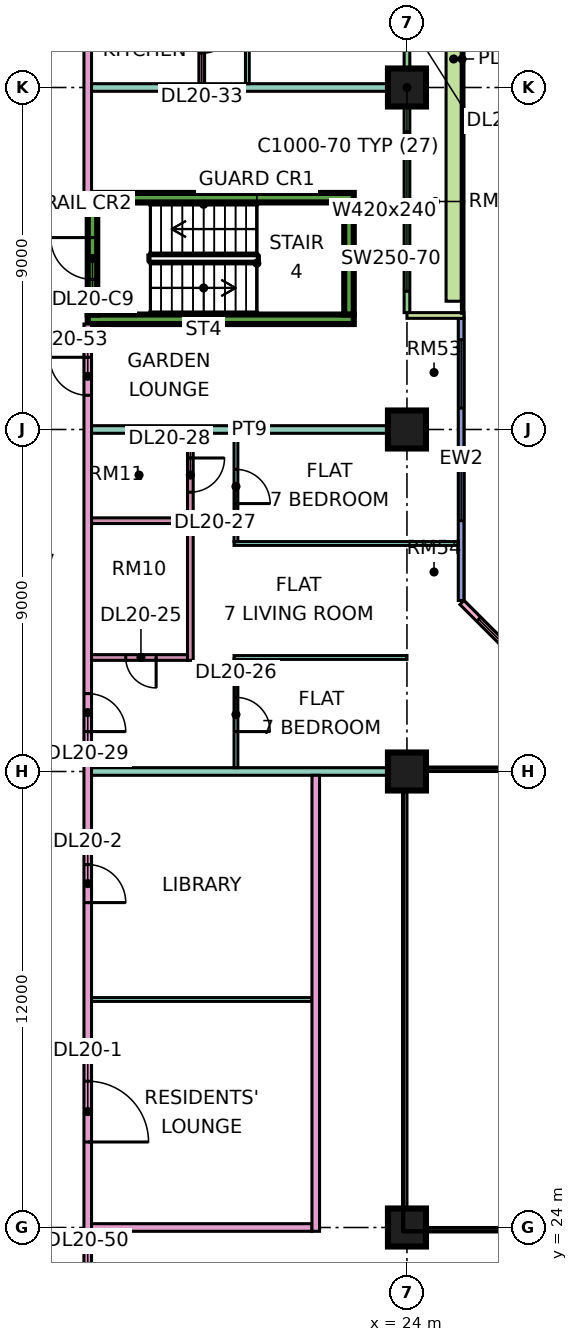
"""IFC4 building model, lengths in metres.
Left out: names, types, materials, properties, quantities, classifications, styles, units other than length and angle.
Written with IfcOpenShell. Run it as: python <this file> out.ifc"""

import sys

from ifc_helpers import new_model, si_unit, direction, frame, frame_2d, origin, origin_2d, place, context, subcontext, project, spatial, rectangle, extrude, element, fill, save


model = new_model("IFC4")
c1 = context("Model", 3, precision=1e-05, world=origin(), true_north=direction((0.0, 1.0)))
c2 = subcontext(c1, "Body", "Model", "MODEL_VIEW")
j1 = project(units=[si_unit("LENGTHUNIT", "METRE"), si_unit("PLANEANGLEUNIT", "RADIAN")], contexts=[c1])
p1 = place(None, origin())
s1 = spatial("IfcSite", under=j1, at=p1, CompositionType="ELEMENT")
p2 = place(p1, origin())
s2 = spatial("IfcBuilding", under=s1, at=p2, CompositionType="ELEMENT")
p3 = place(p2, frame((0.0, 0.0, 91.9)))
s3 = spatial("IfcBuildingStorey", under=s2, at=p3, CompositionType="ELEMENT", Elevation=91.9)
for number, where, z_axis, x_axis in (
    (1, (24.0, 24.0, 0.0), (0.0, 0.0, 1.0), (1.0, 0.0, 0.0)),
    (2, (24.0, 36.0, 0.0), (0.0, 0.0, 1.0), (1.0, 0.0, 0.0)),
    (3, (24.0, 45.0, 0.0), (0.0, 0.0, 1.0), (1.0, 0.0, 0.0)),
    (4, (24.0, 54.0, 0.0), (0.0, 0.0, 1.0), (1.0, 0.0, 0.0)),
):
    element("IfcColumn", number, at=place(p3, frame(where, z_axis=z_axis, x_axis=x_axis)), inside=s3, PredefinedType="COLUMN", context=c2, shape_type="SweptSolid", body=[
        extrude(rectangle(XDim=1.0, YDim=1.0, at=origin_2d()), origin(), (0.0, 0.0, 1.0), 3.75),
    ])
for number, where, z_axis, x_axis in (
    (5, (15.6, 47.9, 0.0), (0.0, 0.0, 1.0), (1.0, 0.0, 0.0)),
    (6, (15.6, 51.1, 0.0), (0.0, 0.0, 1.0), (1.0, 0.0, 0.0)),
):
    element("IfcWall", number, at=place(p3, frame(where, z_axis=z_axis, x_axis=x_axis)), inside=s3, PredefinedType="SHEAR", context=c2, shape_type="SweptSolid", body=[
        extrude(rectangle(XDim=7.0, YDim=0.25, at=frame_2d((3.5, 0.0))), origin(), (0.0, 0.0, 1.0), 3.75),
    ])
p4 = place(p3, frame((15.725, 48.025, 0.0), z_axis=(0.0, 0.0, 1.0), x_axis=(0.0, 1.0, 0.0)))
e7 = element("IfcWall", 7, at=p4, inside=s3, PredefinedType="SHEAR", context=c2, shape_type="SweptSolid", body=[
    extrude(rectangle(XDim=2.95, YDim=0.25, at=frame_2d((1.475, 0.0))), origin(), (0.0, 0.0, 1.0), 3.75),
])
p5 = place(p4, frame((0.925, 0.0, 0.0)))
e8 = element("IfcOpeningElement", 8, at=p5, cuts=e7, PredefinedType="OPENING", context=c2, shape_type="SweptSolid", body=[
    extrude(rectangle(XDim=1.1, YDim=2.2, at=frame_2d((0.55, 1.1))), frame((0.0, 0.135, 0.0), z_axis=(0.0, -1.0, 0.0), x_axis=(1.0, 0.0, 0.0)), (0.0, 0.0, 1.0), 0.27),
])
p6 = place(p3, frame((22.475, 48.025, 0.0), z_axis=(0.0, 0.0, 1.0), x_axis=(0.0, 1.0, 0.0)))
e9 = element("IfcWall", 9, at=p6, inside=s3, PredefinedType="SHEAR", context=c2, shape_type="SweptSolid", body=[
    extrude(rectangle(XDim=2.95, YDim=0.25, at=frame_2d((1.475, 0.0))), origin(), (0.0, 0.0, 1.0), 3.75),
])
p7 = place(p3, frame((28.447, 37.447, 0.0), z_axis=(0.0, 0.0, 1.0), x_axis=(-0.707106781187, 0.707106781187, 0.0)))
e10 = element("IfcWall", 10, at=p7, inside=s3, PredefinedType="SOLIDWALL", context=c2, shape_type="SweptSolid", body=[
    extrude(rectangle(XDim=4.243, YDim=0.15, at=frame_2d((2.121, 0.0))), origin(), (0.0, 0.0, 1.0), 3.35),
])
p8 = place(p7, frame((0.621, 0.0, 0.45)))
e11 = element("IfcOpeningElement", 11, at=p8, cuts=e10, PredefinedType="OPENING", context=c2, shape_type="SweptSolid", body=[
    extrude(rectangle(XDim=3.0, YDim=2.4, at=frame_2d((1.5, 1.2))), frame((0.0, 0.085, 0.0), z_axis=(0.0, -1.0, 0.0), x_axis=(1.0, 0.0, 0.0)), (0.0, 0.0, 1.0), 0.17),
])
p9 = place(p3, frame((25.425, 40.5, 0.0), z_axis=(0.0, 0.0, 1.0), x_axis=(0.0, 1.0, 0.0)))
e12 = element("IfcWall", 12, at=p9, inside=s3, PredefinedType="SOLIDWALL", context=c2, shape_type="SweptSolid", body=[
    extrude(rectangle(XDim=7.425, YDim=0.15, at=frame_2d((3.712, 0.0))), origin(), (0.0, 0.0, 1.0), 3.35),
])
p10 = place(p9, frame((2.1, 0.0, 0.45)))
e13 = element("IfcOpeningElement", 13, at=p10, cuts=e12, PredefinedType="OPENING", context=c2, shape_type="SweptSolid", body=[
    extrude(rectangle(XDim=1.8, YDim=2.4, at=frame_2d((0.9, 1.2))), frame((0.0, 0.085, 0.0), z_axis=(0.0, -1.0, 0.0), x_axis=(1.0, 0.0, 0.0)), (0.0, 0.0, 1.0), 0.17),
])
p11 = place(p9, frame((5.062, 0.0, 0.45)))
e14 = element("IfcOpeningElement", 14, at=p11, cuts=e12, PredefinedType="OPENING", context=c2, shape_type="SweptSolid", body=[
    extrude(rectangle(XDim=1.8, YDim=2.4, at=frame_2d((0.9, 1.2))), frame((0.0, 0.085, 0.0), z_axis=(0.0, -1.0, 0.0), x_axis=(1.0, 0.0, 0.0)), (0.0, 0.0, 1.0), 0.17),
])
p12 = place(p3, frame((24.0, 48.075, 0.0), z_axis=(0.0, 0.0, 1.0), x_axis=(0.0, 1.0, 0.0)))
e15 = element("IfcWall", 15, at=p12, inside=s3, PredefinedType="SOLIDWALL", context=c2, shape_type="SweptSolid", body=[
    extrude(rectangle(XDim=13.35, YDim=0.15, at=frame_2d((6.675, 0.0))), origin(), (0.0, 0.0, 1.0), 3.35),
])
p13 = place(p12, frame((0.562, 0.0, 0.45)))
e16 = element("IfcOpeningElement", 16, at=p13, cuts=e15, PredefinedType="OPENING", context=c2, shape_type="SweptSolid", body=[
    extrude(rectangle(XDim=4.2, YDim=2.4, at=frame_2d((2.1, 1.2))), frame((0.0, 0.085, 0.0), z_axis=(0.0, -1.0, 0.0), x_axis=(1.0, 0.0, 0.0)), (0.0, 0.0, 1.0), 0.17),
])
p14 = place(p12, frame((7.125, 0.0, 0.0)))
e17 = element("IfcOpeningElement", 17, at=p14, cuts=e15, PredefinedType="OPENING", context=c2, shape_type="SweptSolid", body=[
    extrude(rectangle(XDim=1.2, YDim=2.4, at=frame_2d((0.6, 1.2))), frame((0.0, 0.085, 0.0), z_axis=(0.0, -1.0, 0.0), x_axis=(1.0, 0.0, 0.0)), (0.0, 0.0, 1.0), 0.17),
])
p15 = place(p12, frame((9.525, 0.0, 0.45)))
e18 = element("IfcOpeningElement", 18, at=p15, cuts=e15, PredefinedType="OPENING", context=c2, shape_type="SweptSolid", body=[
    extrude(rectangle(XDim=1.8, YDim=2.4, at=frame_2d((0.9, 1.2))), frame((0.0, 0.085, 0.0), z_axis=(0.0, -1.0, 0.0), x_axis=(1.0, 0.0, 0.0)), (0.0, 0.0, 1.0), 0.17),
])
p16 = place(p12, frame((12.188, 0.0, 0.45)))
e19 = element("IfcOpeningElement", 19, at=p16, cuts=e15, PredefinedType="OPENING", context=c2, shape_type="SweptSolid", body=[
    extrude(rectangle(XDim=0.9, YDim=2.4, at=frame_2d((0.45, 1.2))), frame((0.0, 0.085, 0.0), z_axis=(0.0, -1.0, 0.0), x_axis=(1.0, 0.0, 0.0)), (0.0, 0.0, 1.0), 0.17),
])
p17 = place(p3, frame((25.5, 48.0, 0.0), z_axis=(0.0, 0.0, 1.0), x_axis=(-1.0, 0.0, 0.0)))
e20 = element("IfcWall", 20, at=p17, inside=s3, PredefinedType="SOLIDWALL", context=c2, shape_type="SweptSolid", body=[
    extrude(rectangle(XDim=1.5, YDim=0.15, at=frame_2d((0.75, 0.0))), origin(), (0.0, 0.0, 1.0), 3.35),
])
p18 = place(p3, frame((25.229, 48.375, 0.0), z_axis=(0.0, 0.0, 1.0), x_axis=(0.0, 1.0, 0.0)))
e21 = element("IfcWall", 21, at=p18, inside=s3, PredefinedType="SOLIDWALL", context=c2, shape_type="SweptSolid", body=[
    extrude(rectangle(XDim=12.75, YDim=0.4, at=frame_2d((6.375, 0.0))), origin(), (0.0, 0.0, 1.0), 0.7),
])
p19 = place(p3, frame((15.6, 20.0, 0.0), z_axis=(0.0, 0.0, 1.0), x_axis=(0.0, 1.0, 0.0)))
e22 = element("IfcWall", 22, at=p19, inside=s3, PredefinedType="PARTITIONING", context=c2, shape_type="SweptSolid", body=[
    extrude(rectangle(XDim=27.775, YDim=0.2, at=frame_2d((13.887, 0.0))), origin(), (0.0, 0.0, 1.0), 3.35),
])
p20 = place(p19, frame((6.25, 0.0, 0.0)))
e23 = element("IfcOpeningElement", 23, at=p20, cuts=e22, PredefinedType="OPENING", context=c2, shape_type="SweptSolid", body=[
    extrude(rectangle(XDim=1.6, YDim=2.1, at=frame_2d((0.8, 1.05))), frame((0.0, 0.11, 0.0), z_axis=(0.0, -1.0, 0.0), x_axis=(1.0, 0.0, 0.0)), (0.0, 0.0, 1.0), 0.22),
])
p21 = place(p19, frame((12.55, 0.0, 0.0)))
e24 = element("IfcOpeningElement", 24, at=p21, cuts=e22, PredefinedType="OPENING", context=c2, shape_type="SweptSolid", body=[
    extrude(rectangle(XDim=1.0, YDim=2.1, at=frame_2d((0.5, 1.05))), frame((0.0, 0.11, 0.0), z_axis=(0.0, -1.0, 0.0), x_axis=(1.0, 0.0, 0.0)), (0.0, 0.0, 1.0), 0.22),
])
p22 = place(p19, frame((17.05, 0.0, 0.0)))
e25 = element("IfcOpeningElement", 25, at=p22, cuts=e22, PredefinedType="OPENING", context=c2, shape_type="SweptSolid", body=[
    extrude(rectangle(XDim=1.0, YDim=2.1, at=frame_2d((0.5, 1.05))), frame((0.0, 0.11, 0.0), z_axis=(0.0, -1.0, 0.0), x_axis=(1.0, 0.0, 0.0)), (0.0, 0.0, 1.0), 0.22),
])
p23 = place(p19, frame((1.15, 0.0, 0.0)))
e26 = element("IfcOpeningElement", 26, at=p23, cuts=e22, PredefinedType="OPENING", context=c2, shape_type="SweptSolid", body=[
    extrude(rectangle(XDim=1.8, YDim=2.1, at=frame_2d((0.9, 1.05))), frame((0.0, 0.11, 0.0), z_axis=(0.0, -1.0, 0.0), x_axis=(1.0, 0.0, 0.0)), (0.0, 0.0, 1.0), 0.22),
])
p24 = place(p19, frame((25.9, 0.0, 0.0)))
e27 = element("IfcOpeningElement", 27, at=p24, cuts=e22, PredefinedType="OPENING", context=c2, shape_type="SweptSolid", body=[
    extrude(rectangle(XDim=1.0, YDim=2.1, at=frame_2d((0.5, 1.05))), frame((0.0, 0.11, 0.0), z_axis=(0.0, -1.0, 0.0), x_axis=(1.0, 0.0, 0.0)), (0.0, 0.0, 1.0), 0.22),
])
p25 = place(p3, frame((15.6, 51.225, 0.0), z_axis=(0.0, 0.0, 1.0), x_axis=(0.0, 1.0, 0.0)))
e28 = element("IfcWall", 28, at=p25, inside=s3, PredefinedType="PARTITIONING", context=c2, shape_type="SweptSolid", body=[
    extrude(rectangle(XDim=13.125, YDim=0.2, at=frame_2d((6.562, 0.0))), origin(), (0.0, 0.0, 1.0), 3.35),
])
p26 = place(p25, frame((9.825, 0.0, 0.0)))
e29 = element("IfcOpeningElement", 29, at=p26, cuts=e28, PredefinedType="OPENING", context=c2, shape_type="SweptSolid", body=[
    extrude(rectangle(XDim=1.0, YDim=2.1, at=frame_2d((0.5, 1.05))), frame((0.0, 0.11, 0.0), z_axis=(0.0, -1.0, 0.0), x_axis=(1.0, 0.0, 0.0)), (0.0, 0.0, 1.0), 0.22),
])
p27 = place(p3, frame((15.7, 24.0, 0.0), z_axis=(0.0, 0.0, 1.0), x_axis=(1.0, 0.0, 0.0)))
e30 = element("IfcWall", 30, at=p27, inside=s3, PredefinedType="PARTITIONING", context=c2, shape_type="SweptSolid", body=[
    extrude(rectangle(XDim=5.8, YDim=0.2, at=frame_2d((2.9, 0.0))), origin(), (0.0, 0.0, 1.0), 3.35),
])
p28 = place(p3, frame((15.7, 30.0, 0.0), z_axis=(0.0, 0.0, 1.0), x_axis=(1.0, 0.0, 0.0)))
e31 = element("IfcWall", 31, at=p28, inside=s3, PredefinedType="PARTITIONING", context=c2, shape_type="SweptSolid", body=[
    extrude(rectangle(XDim=5.8, YDim=0.1, at=frame_2d((2.9, 0.0))), origin(), (0.0, 0.0, 1.0), 3.35),
])
p29 = place(p3, frame((15.7, 36.0, 0.0), z_axis=(0.0, 0.0, 1.0), x_axis=(1.0, 0.0, 0.0)))
e32 = element("IfcWall", 32, at=p29, inside=s3, PredefinedType="PARTITIONING", context=c2, shape_type="SweptSolid", body=[
    extrude(rectangle(XDim=8.3, YDim=0.2, at=frame_2d((4.15, 0.0))), origin(), (0.0, 0.0, 1.0), 3.35),
])
p30 = place(p3, frame((15.7, 39.0, 0.0), z_axis=(0.0, 0.0, 1.0), x_axis=(1.0, 0.0, 0.0)))
e33 = element("IfcWall", 33, at=p30, inside=s3, PredefinedType="PARTITIONING", context=c2, shape_type="SweptSolid", body=[
    extrude(rectangle(XDim=2.525, YDim=0.15, at=frame_2d((1.263, 0.0))), origin(), (0.0, 0.0, 1.0), 3.35),
])
p31 = place(p30, frame((0.9, 0.0, 0.0)))
e34 = element("IfcOpeningElement", 34, at=p31, cuts=e33, PredefinedType="OPENING", context=c2, shape_type="SweptSolid", body=[
    extrude(rectangle(XDim=0.8, YDim=2.1, at=frame_2d((0.4, 1.05))), frame((0.0, 0.085, 0.0), z_axis=(0.0, -1.0, 0.0), x_axis=(1.0, 0.0, 0.0)), (0.0, 0.0, 1.0), 0.17),
])
p32 = place(p3, frame((15.7, 42.6, 0.0), z_axis=(0.0, 0.0, 1.0), x_axis=(1.0, 0.0, 0.0)))
e35 = element("IfcWall", 35, at=p32, inside=s3, PredefinedType="PARTITIONING", context=c2, shape_type="SweptSolid", body=[
    extrude(rectangle(XDim=2.525, YDim=0.15, at=frame_2d((1.263, 0.0))), origin(), (0.0, 0.0, 1.0), 3.35),
])
p33 = place(p3, frame((15.7, 45.0, 0.0), z_axis=(0.0, 0.0, 1.0), x_axis=(1.0, 0.0, 0.0)))
e36 = element("IfcWall", 36, at=p33, inside=s3, PredefinedType="PARTITIONING", context=c2, shape_type="SweptSolid", body=[
    extrude(rectangle(XDim=8.3, YDim=0.2, at=frame_2d((4.15, 0.0))), origin(), (0.0, 0.0, 1.0), 3.35),
])
p34 = place(p3, frame((15.7, 54.0, 0.0), z_axis=(0.0, 0.0, 1.0), x_axis=(1.0, 0.0, 0.0)))
e37 = element("IfcWall", 37, at=p34, inside=s3, PredefinedType="PARTITIONING", context=c2, shape_type="SweptSolid", body=[
    extrude(rectangle(XDim=8.226, YDim=0.2, at=frame_2d((4.113, 0.0))), origin(), (0.0, 0.0, 1.0), 3.35),
])
p35 = place(p3, frame((18.3, 38.925, 0.0), z_axis=(0.0, 0.0, 1.0), x_axis=(0.0, 1.0, 0.0)))
e38 = element("IfcWall", 38, at=p35, inside=s3, PredefinedType="PARTITIONING", context=c2, shape_type="SweptSolid", body=[
    extrude(rectangle(XDim=5.975, YDim=0.15, at=frame_2d((2.987, 0.0))), origin(), (0.0, 0.0, 1.0), 3.35),
])
p36 = place(p35, frame((4.425, 0.0, 0.0)))
e39 = element("IfcOpeningElement", 39, at=p36, cuts=e38, PredefinedType="OPENING", context=c2, shape_type="SweptSolid", body=[
    extrude(rectangle(XDim=0.9, YDim=2.1, at=frame_2d((0.45, 1.05))), frame((0.0, 0.085, 0.0), z_axis=(0.0, -1.0, 0.0), x_axis=(1.0, 0.0, 0.0)), (0.0, 0.0, 1.0), 0.17),
])
p37 = place(p3, frame((18.6, 54.1, 0.0), z_axis=(0.0, 0.0, 1.0), x_axis=(0.0, 1.0, 0.0)))
e40 = element("IfcWall", 40, at=p37, inside=s3, PredefinedType="PARTITIONING", context=c2, shape_type="SweptSolid", body=[
    extrude(rectangle(XDim=5.975, YDim=0.15, at=frame_2d((2.987, 0.0))), origin(), (0.0, 0.0, 1.0), 3.35),
])
p38 = place(p37, frame((3.9, 0.0, 0.0)))
e41 = element("IfcOpeningElement", 41, at=p38, cuts=e40, PredefinedType="OPENING", context=c2, shape_type="SweptSolid", body=[
    extrude(rectangle(XDim=0.8, YDim=2.1, at=frame_2d((0.4, 1.05))), frame((0.0, 0.085, 0.0), z_axis=(0.0, -1.0, 0.0), x_axis=(1.0, 0.0, 0.0)), (0.0, 0.0, 1.0), 0.17),
])
p39 = place(p37, frame((0.8, 0.0, 0.0)))
e42 = element("IfcOpeningElement", 42, at=p39, cuts=e40, PredefinedType="OPENING", context=c2, shape_type="SweptSolid", body=[
    extrude(rectangle(XDim=0.9, YDim=2.1, at=frame_2d((0.45, 1.05))), frame((0.0, 0.085, 0.0), z_axis=(0.0, -1.0, 0.0), x_axis=(1.0, 0.0, 0.0)), (0.0, 0.0, 1.0), 0.17),
])
p40 = place(p3, frame((19.45, 39.0, 0.0), z_axis=(0.0, 0.0, 1.0), x_axis=(1.0, 0.0, 0.0)))
e43 = element("IfcWall", 43, at=p40, inside=s3, PredefinedType="PARTITIONING", context=c2, shape_type="SweptSolid", body=[
    extrude(rectangle(XDim=4.55, YDim=0.1, at=frame_2d((2.275, 0.0))), origin(), (0.0, 0.0, 1.0), 3.35),
])
p41 = place(p3, frame((19.45, 42.0, 0.0), z_axis=(0.0, 0.0, 1.0), x_axis=(1.0, 0.0, 0.0)))
e44 = element("IfcWall", 44, at=p41, inside=s3, PredefinedType="PARTITIONING", context=c2, shape_type="SweptSolid", body=[
    extrude(rectangle(XDim=5.9, YDim=0.1, at=frame_2d((2.95, 0.0))), origin(), (0.0, 0.0, 1.0), 3.35),
])
p42 = place(p3, frame((19.5, 36.1, 0.0), z_axis=(0.0, 0.0, 1.0), x_axis=(0.0, 1.0, 0.0)))
e45 = element("IfcWall", 45, at=p42, inside=s3, PredefinedType="PARTITIONING", context=c2, shape_type="SweptSolid", body=[
    extrude(rectangle(XDim=2.85, YDim=0.1, at=frame_2d((1.425, 0.0))), origin(), (0.0, 0.0, 1.0), 3.35),
])
p43 = place(p42, frame((0.95, 0.0, 0.0)))
e46 = element("IfcOpeningElement", 46, at=p43, cuts=e45, PredefinedType="OPENING", context=c2, shape_type="SweptSolid", body=[
    extrude(rectangle(XDim=0.9, YDim=2.1, at=frame_2d((0.45, 1.05))), frame((0.0, 0.06, 0.0), z_axis=(0.0, -1.0, 0.0), x_axis=(1.0, 0.0, 0.0)), (0.0, 0.0, 1.0), 0.12),
])
p44 = place(p3, frame((19.5, 42.05, 0.0), z_axis=(0.0, 0.0, 1.0), x_axis=(0.0, 1.0, 0.0)))
e47 = element("IfcWall", 47, at=p44, inside=s3, PredefinedType="PARTITIONING", context=c2, shape_type="SweptSolid", body=[
    extrude(rectangle(XDim=2.85, YDim=0.1, at=frame_2d((1.425, 0.0))), origin(), (0.0, 0.0, 1.0), 3.35),
])
p45 = place(p44, frame((1.0, 0.0, 0.0)))
e48 = element("IfcOpeningElement", 48, at=p45, cuts=e47, PredefinedType="OPENING", context=c2, shape_type="SweptSolid", body=[
    extrude(rectangle(XDim=0.9, YDim=2.1, at=frame_2d((0.45, 1.05))), frame((0.0, 0.06, 0.0), z_axis=(0.0, -1.0, 0.0), x_axis=(1.0, 0.0, 0.0)), (0.0, 0.0, 1.0), 0.12),
])
p46 = place(p3, frame((19.8, 54.1, 0.0), z_axis=(0.0, 0.0, 1.0), x_axis=(0.0, 1.0, 0.0)))
e49 = element("IfcWall", 49, at=p46, inside=s3, PredefinedType="PARTITIONING", context=c2, shape_type="SweptSolid", body=[
    extrude(rectangle(XDim=2.85, YDim=0.1, at=frame_2d((1.425, 0.0))), origin(), (0.0, 0.0, 1.0), 3.35),
])
p47 = place(p3, frame((21.6, 23.9, 0.0), z_axis=(0.0, 0.0, 1.0), x_axis=(0.0, 1.0, 0.0)))
e50 = element("IfcWall", 50, at=p47, inside=s3, PredefinedType="PARTITIONING", context=c2, shape_type="SweptSolid", body=[
    extrude(rectangle(XDim=12.0, YDim=0.2, at=frame_2d((6.0, 0.0))), origin(), (0.0, 0.0, 1.0), 3.35),
])
p48 = place(p8, origin())
e51 = element("IfcWindow", 51, at=p48, inside=s3, PartitioningType="SINGLE_PANEL", PredefinedType="WINDOW", context=c2, shape_type="SweptSolid", body=[
    extrude(rectangle(XDim=3.0, YDim=2.4, at=frame_2d((1.5, 1.2))), frame((0.0, 0.03, 0.0), z_axis=(0.0, -1.0, 0.0), x_axis=(1.0, 0.0, 0.0)), (0.0, 0.0, 1.0), 0.06),
])
fill(e11, e51)
p49 = place(p10, origin())
e52 = element("IfcWindow", 52, at=p49, inside=s3, PartitioningType="SINGLE_PANEL", PredefinedType="WINDOW", context=c2, shape_type="SweptSolid", body=[
    extrude(rectangle(XDim=1.8, YDim=2.4, at=frame_2d((0.9, 1.2))), frame((0.0, 0.03, 0.0), z_axis=(0.0, -1.0, 0.0), x_axis=(1.0, 0.0, 0.0)), (0.0, 0.0, 1.0), 0.06),
])
fill(e13, e52)
p50 = place(p11, origin())
e53 = element("IfcWindow", 53, at=p50, inside=s3, PartitioningType="SINGLE_PANEL", PredefinedType="WINDOW", context=c2, shape_type="SweptSolid", body=[
    extrude(rectangle(XDim=1.8, YDim=2.4, at=frame_2d((0.9, 1.2))), frame((0.0, 0.03, 0.0), z_axis=(0.0, -1.0, 0.0), x_axis=(1.0, 0.0, 0.0)), (0.0, 0.0, 1.0), 0.06),
])
fill(e14, e53)
p51 = place(p13, origin())
e54 = element("IfcWindow", 54, at=p51, inside=s3, PartitioningType="SINGLE_PANEL", PredefinedType="WINDOW", context=c2, shape_type="SweptSolid", body=[
    extrude(rectangle(XDim=4.2, YDim=2.4, at=frame_2d((2.1, 1.2))), frame((0.0, 0.03, 0.0), z_axis=(0.0, -1.0, 0.0), x_axis=(1.0, 0.0, 0.0)), (0.0, 0.0, 1.0), 0.06),
])
fill(e16, e54)
p52 = place(p5, frame((1.1, 0.0, 0.0), z_axis=(0.0, 0.0, 1.0), x_axis=(-1.0, 0.0, 0.0)))
e55 = element("IfcDoor", 55, at=p52, inside=s3, OperationType="SINGLE_SWING_RIGHT", PredefinedType="DOOR", context=c2, shape_type="SweptSolid", body=[
    extrude(rectangle(XDim=1.1, YDim=2.2, at=frame_2d((0.55, 1.1))), frame((0.0, 0.025, 0.0), z_axis=(0.0, -1.0, 0.0), x_axis=(1.0, 0.0, 0.0)), (0.0, 0.0, 1.0), 0.05),
])
fill(e8, e55)
p53 = place(p20, frame((1.6, 0.0, 0.0), z_axis=(0.0, 0.0, 1.0), x_axis=(-1.0, 0.0, 0.0)))
e56 = element("IfcDoor", 56, at=p53, inside=s3, OperationType="DOUBLE_DOOR_SINGLE_SWING", PredefinedType="DOOR", context=c2, shape_type="SweptSolid", body=[
    extrude(rectangle(XDim=1.6, YDim=2.1, at=frame_2d((0.8, 1.05))), frame((0.0, 0.025, 0.0), z_axis=(0.0, -1.0, 0.0), x_axis=(1.0, 0.0, 0.0)), (0.0, 0.0, 1.0), 0.05),
])
fill(e23, e56)
p54 = place(p21, frame((1.0, 0.0, 0.0), z_axis=(0.0, 0.0, 1.0), x_axis=(-1.0, 0.0, 0.0)))
e57 = element("IfcDoor", 57, at=p54, inside=s3, OperationType="SINGLE_SWING_LEFT", PredefinedType="DOOR", context=c2, shape_type="SweptSolid", body=[
    extrude(rectangle(XDim=1.0, YDim=2.1, at=frame_2d((0.5, 1.05))), frame((0.0, 0.025, 0.0), z_axis=(0.0, -1.0, 0.0), x_axis=(1.0, 0.0, 0.0)), (0.0, 0.0, 1.0), 0.05),
])
fill(e24, e57)
p55 = place(p31, origin())
e58 = element("IfcDoor", 58, at=p55, inside=s3, OperationType="SINGLE_SWING_RIGHT", PredefinedType="DOOR", context=c2, shape_type="SweptSolid", body=[
    extrude(rectangle(XDim=0.8, YDim=2.1, at=frame_2d((0.4, 1.05))), frame((0.0, 0.025, 0.0), z_axis=(0.0, -1.0, 0.0), x_axis=(1.0, 0.0, 0.0)), (0.0, 0.0, 1.0), 0.05),
])
fill(e34, e58)
p56 = place(p43, frame((0.9, 0.0, 0.0), z_axis=(0.0, 0.0, 1.0), x_axis=(-1.0, 0.0, 0.0)))
e59 = element("IfcDoor", 59, at=p56, inside=s3, OperationType="SINGLE_SWING_LEFT", PredefinedType="DOOR", context=c2, shape_type="SweptSolid", body=[
    extrude(rectangle(XDim=0.9, YDim=2.1, at=frame_2d((0.45, 1.05))), frame((0.0, 0.025, 0.0), z_axis=(0.0, -1.0, 0.0), x_axis=(1.0, 0.0, 0.0)), (0.0, 0.0, 1.0), 0.05),
])
fill(e46, e59)
p57 = place(p45, frame((0.9, 0.0, 0.0), z_axis=(0.0, 0.0, 1.0), x_axis=(-1.0, 0.0, 0.0)))
e60 = element("IfcDoor", 60, at=p57, inside=s3, OperationType="SINGLE_SWING_LEFT", PredefinedType="DOOR", context=c2, shape_type="SweptSolid", body=[
    extrude(rectangle(XDim=0.9, YDim=2.1, at=frame_2d((0.45, 1.05))), frame((0.0, 0.025, 0.0), z_axis=(0.0, -1.0, 0.0), x_axis=(1.0, 0.0, 0.0)), (0.0, 0.0, 1.0), 0.05),
])
fill(e48, e60)
p58 = place(p36, origin())
e61 = element("IfcDoor", 61, at=p58, inside=s3, OperationType="SINGLE_SWING_RIGHT", PredefinedType="DOOR", context=c2, shape_type="SweptSolid", body=[
    extrude(rectangle(XDim=0.9, YDim=2.1, at=frame_2d((0.45, 1.05))), frame((0.0, 0.025, 0.0), z_axis=(0.0, -1.0, 0.0), x_axis=(1.0, 0.0, 0.0)), (0.0, 0.0, 1.0), 0.05),
])
fill(e39, e61)
p59 = place(p22, frame((1.0, 0.0, 0.0), z_axis=(0.0, 0.0, 1.0), x_axis=(-1.0, 0.0, 0.0)))
e62 = element("IfcDoor", 62, at=p59, inside=s3, OperationType="SINGLE_SWING_LEFT", PredefinedType="DOOR", context=c2, shape_type="SweptSolid", body=[
    extrude(rectangle(XDim=1.0, YDim=2.1, at=frame_2d((0.5, 1.05))), frame((0.0, 0.025, 0.0), z_axis=(0.0, -1.0, 0.0), x_axis=(1.0, 0.0, 0.0)), (0.0, 0.0, 1.0), 0.05),
])
fill(e25, e62)
p60 = place(p39, origin())
e63 = element("IfcDoor", 63, at=p60, inside=s3, OperationType="SINGLE_SWING_RIGHT", PredefinedType="DOOR", context=c2, shape_type="SweptSolid", body=[
    extrude(rectangle(XDim=0.9, YDim=2.1, at=frame_2d((0.45, 1.05))), frame((0.0, 0.025, 0.0), z_axis=(0.0, -1.0, 0.0), x_axis=(1.0, 0.0, 0.0)), (0.0, 0.0, 1.0), 0.05),
])
fill(e42, e63)
p61 = place(p24, frame((1.0, 0.0, 0.0), z_axis=(0.0, 0.0, 1.0), x_axis=(-1.0, 0.0, 0.0)))
e64 = element("IfcDoor", 64, at=p61, inside=s3, OperationType="SINGLE_SWING_RIGHT", PredefinedType="DOOR", context=c2, shape_type="SweptSolid", body=[
    extrude(rectangle(XDim=1.0, YDim=2.1, at=frame_2d((0.5, 1.05))), frame((0.0, 0.025, 0.0), z_axis=(0.0, -1.0, 0.0), x_axis=(1.0, 0.0, 0.0)), (0.0, 0.0, 1.0), 0.05),
])
fill(e27, e64)
save(model, sys.argv[1])
